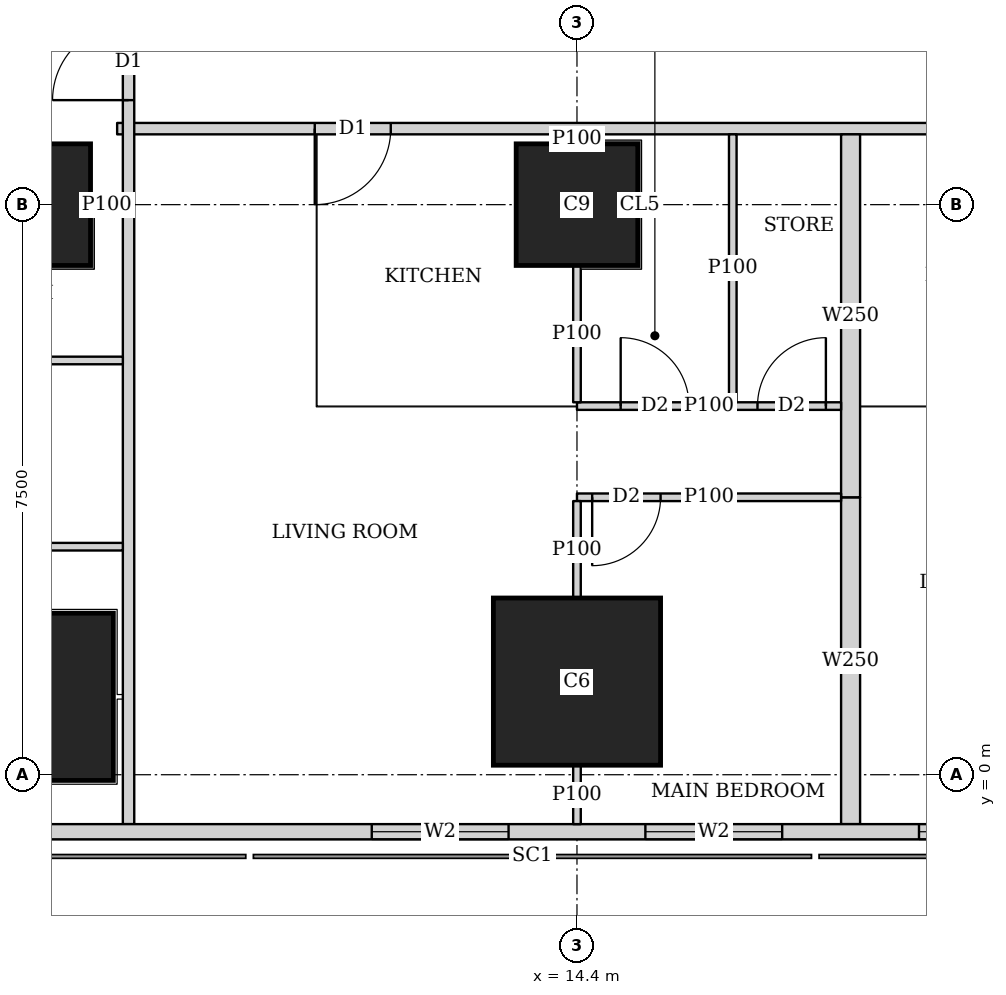
"""IFC4 building model, lengths in metres.
Left out: names, types, materials, properties, quantities, classifications, styles, units other than length and angle.
Written with IfcOpenShell. Run it as: python <this file> out.ifc"""

import sys

from ifc_helpers import new_model, si_unit, direction, frame, frame_2d, origin, origin_2d, place, context, subcontext, project, spatial, rectangle, extrude, element, fill, save


model = new_model("IFC4")
c1 = context("Model", 3, precision=1e-05, world=origin(), true_north=direction((0.0, 1.0)))
c2 = subcontext(c1, "Body", "Model", "MODEL_VIEW")
j1 = project(units=[si_unit("LENGTHUNIT", "METRE"), si_unit("PLANEANGLEUNIT", "RADIAN")], contexts=[c1])
p1 = place(None, origin())
s1 = spatial("IfcSite", under=j1, at=p1, CompositionType="ELEMENT")
p2 = place(p1, origin())
s2 = spatial("IfcBuilding", under=s1, at=p2, CompositionType="ELEMENT")
p3 = place(p2, frame((0.0, 0.0, 89.15)))
s3 = spatial("IfcBuildingStorey", under=s2, at=p3, CompositionType="ELEMENT", Elevation=89.15)
for number, where, z_axis, x_axis in (
    (1, (7.2, 1.025, 0.0), (0.0, 0.0, 1.0), (1.0, 0.0, 0.0)),
    (2, (14.4, 1.225, 0.0), (0.0, 0.0, 1.0), (1.0, 0.0, 0.0)),
):
    element("IfcColumn", number, at=place(p3, frame(where, z_axis=z_axis, x_axis=x_axis)), inside=s3, PredefinedType="COLUMN", context=c2, shape_type="SweptSolid", body=[
        extrude(rectangle(XDim=2.2, YDim=2.2, at=origin_2d()), origin(), (0.0, 0.0, 1.0), 3.75),
    ])
for number, where, z_axis, x_axis in (
    (3, (7.2, 7.5, 0.0), (0.0, 0.0, 1.0), (1.0, 0.0, 0.0)),
    (4, (14.4, 7.5, 0.0), (0.0, 0.0, 1.0), (1.0, 0.0, 0.0)),
):
    element("IfcColumn", number, at=place(p3, frame(where, z_axis=z_axis, x_axis=x_axis)), inside=s3, PredefinedType="COLUMN", context=c2, shape_type="SweptSolid", body=[
        extrude(rectangle(XDim=1.6, YDim=1.6, at=origin_2d()), origin(), (0.0, 0.0, 1.0), 3.75),
    ])
p4 = place(p3, frame((2.163, -0.75, 0.0), z_axis=(0.0, 0.0, 1.0), x_axis=(1.0, 0.0, 0.0)))
e5 = element("IfcWall", 5, at=p4, inside=s3, PredefinedType="SOLIDWALL", context=c2, shape_type="SweptSolid", body=[
    extrude(rectangle(XDim=45.628, YDim=0.2, at=frame_2d((22.814, 0.0))), origin(), (0.0, 0.0, 1.0), 3.5),
])
p5 = place(p4, frame((9.537, 0.0, 0.9)))
e6 = element("IfcOpeningElement", 6, at=p5, cuts=e5, PredefinedType="OPENING", context=c2, shape_type="SweptSolid", body=[
    extrude(rectangle(XDim=1.8, YDim=1.5, at=frame_2d((0.9, 0.75))), frame((0.0, 0.11, 0.0), z_axis=(0.0, -1.0, 0.0), x_axis=(1.0, 0.0, 0.0)), (0.0, 0.0, 1.0), 0.22),
])
p6 = place(p4, frame((13.137, 0.0, 0.9)))
e7 = element("IfcOpeningElement", 7, at=p6, cuts=e5, PredefinedType="OPENING", context=c2, shape_type="SweptSolid", body=[
    extrude(rectangle(XDim=1.8, YDim=1.5, at=frame_2d((0.9, 0.75))), frame((0.0, 0.11, 0.0), z_axis=(0.0, -1.0, 0.0), x_axis=(1.0, 0.0, 0.0)), (0.0, 0.0, 1.0), 0.22),
])
p7 = place(p4, frame((16.737, 0.0, 0.9)))
e8 = element("IfcOpeningElement", 8, at=p7, cuts=e5, PredefinedType="OPENING", context=c2, shape_type="SweptSolid", body=[
    extrude(rectangle(XDim=1.8, YDim=1.5, at=frame_2d((0.9, 0.75))), frame((0.0, 0.11, 0.0), z_axis=(0.0, -1.0, 0.0), x_axis=(1.0, 0.0, 0.0)), (0.0, 0.0, 1.0), 0.22),
])
p8 = place(p4, frame((20.337, 0.0, 0.9)))
e9 = element("IfcOpeningElement", 9, at=p8, cuts=e5, PredefinedType="OPENING", context=c2, shape_type="SweptSolid", body=[
    extrude(rectangle(XDim=1.8, YDim=1.5, at=frame_2d((0.9, 0.75))), frame((0.0, 0.11, 0.0), z_axis=(0.0, -1.0, 0.0), x_axis=(1.0, 0.0, 0.0)), (0.0, 0.0, 1.0), 0.22),
])
p9 = place(p4, frame((23.937, 0.0, 0.9)))
e10 = element("IfcOpeningElement", 10, at=p9, cuts=e5, PredefinedType="OPENING", context=c2, shape_type="SweptSolid", body=[
    extrude(rectangle(XDim=1.8, YDim=1.5, at=frame_2d((0.9, 0.75))), frame((0.0, 0.11, 0.0), z_axis=(0.0, -1.0, 0.0), x_axis=(1.0, 0.0, 0.0)), (0.0, 0.0, 1.0), 0.22),
])
p10 = place(p4, frame((27.537, 0.0, 0.9)))
e11 = element("IfcOpeningElement", 11, at=p10, cuts=e5, PredefinedType="OPENING", context=c2, shape_type="SweptSolid", body=[
    extrude(rectangle(XDim=1.8, YDim=1.5, at=frame_2d((0.9, 0.75))), frame((0.0, 0.11, 0.0), z_axis=(0.0, -1.0, 0.0), x_axis=(1.0, 0.0, 0.0)), (0.0, 0.0, 1.0), 0.22),
])
p11 = place(p4, frame((31.137, 0.0, 0.9)))
e12 = element("IfcOpeningElement", 12, at=p11, cuts=e5, PredefinedType="OPENING", context=c2, shape_type="SweptSolid", body=[
    extrude(rectangle(XDim=1.8, YDim=1.5, at=frame_2d((0.9, 0.75))), frame((0.0, 0.11, 0.0), z_axis=(0.0, -1.0, 0.0), x_axis=(1.0, 0.0, 0.0)), (0.0, 0.0, 1.0), 0.22),
])
p12 = place(p4, frame((34.737, 0.0, 0.9)))
e13 = element("IfcOpeningElement", 13, at=p12, cuts=e5, PredefinedType="OPENING", context=c2, shape_type="SweptSolid", body=[
    extrude(rectangle(XDim=1.8, YDim=1.5, at=frame_2d((0.9, 0.75))), frame((0.0, 0.11, 0.0), z_axis=(0.0, -1.0, 0.0), x_axis=(1.0, 0.0, 0.0)), (0.0, 0.0, 1.0), 0.22),
])
p13 = place(p3, frame((8.5, -0.65, 0.0), z_axis=(0.0, 0.0, 1.0), x_axis=(0.0, 1.0, 0.0)))
e14 = element("IfcWall", 14, at=p13, inside=s3, PredefinedType="SOLIDWALL", context=c2, shape_type="SweptSolid", body=[
    extrude(rectangle(XDim=46.3, YDim=0.15, at=frame_2d((23.15, 0.0))), origin(), (0.0, 0.0, 1.0), 2.2),
])
p14 = place(p13, frame((9.525, 0.0, 0.0)))
e15 = element("IfcOpeningElement", 15, at=p14, cuts=e14, PredefinedType="OPENING", context=c2, shape_type="SweptSolid", body=[
    extrude(rectangle(XDim=1.0, YDim=2.1, at=frame_2d((0.5, 1.05))), frame((0.0, 0.085, 0.0), z_axis=(0.0, -1.0, 0.0), x_axis=(1.0, 0.0, 0.0)), (0.0, 0.0, 1.0), 0.17),
])
p15 = place(p13, frame((13.275, 0.0, 0.0)))
e16 = element("IfcOpeningElement", 16, at=p15, cuts=e14, PredefinedType="OPENING", context=c2, shape_type="SweptSolid", body=[
    extrude(rectangle(XDim=1.0, YDim=2.1, at=frame_2d((0.5, 1.05))), frame((0.0, 0.085, 0.0), z_axis=(0.0, -1.0, 0.0), x_axis=(1.0, 0.0, 0.0)), (0.0, 0.0, 1.0), 0.17),
])
p16 = place(p13, frame((20.775, 0.0, 0.0)))
e17 = element("IfcOpeningElement", 17, at=p16, cuts=e14, PredefinedType="OPENING", context=c2, shape_type="SweptSolid", body=[
    extrude(rectangle(XDim=1.0, YDim=2.1, at=frame_2d((0.5, 1.05))), frame((0.0, 0.085, 0.0), z_axis=(0.0, -1.0, 0.0), x_axis=(1.0, 0.0, 0.0)), (0.0, 0.0, 1.0), 0.17),
])
p17 = place(p13, frame((32.025, 0.0, 0.0)))
e18 = element("IfcOpeningElement", 18, at=p17, cuts=e14, PredefinedType="OPENING", context=c2, shape_type="SweptSolid", body=[
    extrude(rectangle(XDim=1.0, YDim=2.1, at=frame_2d((0.5, 1.05))), frame((0.0, 0.085, 0.0), z_axis=(0.0, -1.0, 0.0), x_axis=(1.0, 0.0, 0.0)), (0.0, 0.0, 1.0), 0.17),
])
p18 = place(p3, frame((40.053, 8.5, 0.0), z_axis=(0.0, 0.0, 1.0), x_axis=(-1.0, 0.0, 0.0)))
e19 = element("IfcWall", 19, at=p18, inside=s3, PredefinedType="SOLIDWALL", context=c2, shape_type="SweptSolid", body=[
    extrude(rectangle(XDim=31.703, YDim=0.15, at=frame_2d((15.852, 0.0))), origin(), (0.0, 0.0, 1.0), 3.5),
])
p19 = place(p18, frame((28.103, 0.0, 0.0)))
e20 = element("IfcOpeningElement", 20, at=p19, cuts=e19, PredefinedType="OPENING", context=c2, shape_type="SweptSolid", body=[
    extrude(rectangle(XDim=1.0, YDim=2.1, at=frame_2d((0.5, 1.05))), frame((0.0, 0.085, 0.0), z_axis=(0.0, -1.0, 0.0), x_axis=(1.0, 0.0, 0.0)), (0.0, 0.0, 1.0), 0.17),
])
p20 = place(p18, frame((19.953, 0.0, 0.0)))
e21 = element("IfcOpeningElement", 21, at=p20, cuts=e19, PredefinedType="OPENING", context=c2, shape_type="SweptSolid", body=[
    extrude(rectangle(XDim=1.0, YDim=2.1, at=frame_2d((0.5, 1.05))), frame((0.0, 0.085, 0.0), z_axis=(0.0, -1.0, 0.0), x_axis=(1.0, 0.0, 0.0)), (0.0, 0.0, 1.0), 0.17),
])
p21 = place(p18, frame((12.753, 0.0, 0.0)))
e22 = element("IfcOpeningElement", 22, at=p21, cuts=e19, PredefinedType="OPENING", context=c2, shape_type="SweptSolid", body=[
    extrude(rectangle(XDim=1.0, YDim=2.1, at=frame_2d((0.5, 1.05))), frame((0.0, 0.085, 0.0), z_axis=(0.0, -1.0, 0.0), x_axis=(1.0, 0.0, 0.0)), (0.0, 0.0, 1.0), 0.17),
])
p22 = place(p18, frame((0.15, 0.0, 0.0)))
e23 = element("IfcOpeningElement", 23, at=p22, cuts=e19, PredefinedType="OPENING", context=c2, shape_type="SweptSolid", body=[
    extrude(rectangle(XDim=1.0, YDim=2.1, at=frame_2d((0.5, 1.05))), frame((0.0, 0.085, 0.0), z_axis=(0.0, -1.0, 0.0), x_axis=(1.0, 0.0, 0.0)), (0.0, 0.0, 1.0), 0.17),
])
p23 = place(p3, frame((8.001, 7.5, 0.0), z_axis=(0.0, 0.0, 1.0), x_axis=(1.0, 0.0, 0.0)))
e24 = element("IfcWall", 24, at=p23, inside=s3, PredefinedType="PARTITIONING", context=c2, shape_type="SweptSolid", body=[
    extrude(rectangle(XDim=0.424, YDim=0.1, at=frame_2d((0.212, 0.0))), origin(), (0.0, 0.0, 1.0), 3.5),
])
p24 = place(p3, frame((4.9, 5.45, 0.0), z_axis=(0.0, 0.0, 1.0), x_axis=(1.0, 0.0, 0.0)))
e25 = element("IfcWall", 25, at=p24, inside=s3, PredefinedType="PARTITIONING", context=c2, shape_type="SweptSolid", body=[
    extrude(rectangle(XDim=3.525, YDim=0.1, at=frame_2d((1.763, 0.0))), origin(), (0.0, 0.0, 1.0), 3.5),
])
p25 = place(p3, frame((17.875, 3.65, 0.0), z_axis=(0.0, 0.0, 1.0), x_axis=(-1.0, 0.0, 0.0)))
e26 = element("IfcWall", 26, at=p25, inside=s3, PredefinedType="PARTITIONING", context=c2, shape_type="SweptSolid", body=[
    extrude(rectangle(XDim=3.475, YDim=0.1, at=frame_2d((1.738, 0.0))), origin(), (0.0, 0.0, 1.0), 3.5),
])
p26 = place(p25, frame((2.375, 0.0, 0.0)))
e27 = element("IfcOpeningElement", 27, at=p26, cuts=e26, PredefinedType="OPENING", context=c2, shape_type="SweptSolid", body=[
    extrude(rectangle(XDim=0.9, YDim=2.1, at=frame_2d((0.45, 1.05))), frame((0.0, 0.06, 0.0), z_axis=(0.0, -1.0, 0.0), x_axis=(1.0, 0.0, 0.0)), (0.0, 0.0, 1.0), 0.12),
])
p27 = place(p3, frame((17.875, 4.85, 0.0), z_axis=(0.0, 0.0, 1.0), x_axis=(-1.0, 0.0, 0.0)))
e28 = element("IfcWall", 28, at=p27, inside=s3, PredefinedType="PARTITIONING", context=c2, shape_type="SweptSolid", body=[
    extrude(rectangle(XDim=3.475, YDim=0.1, at=frame_2d((1.738, 0.0))), origin(), (0.0, 0.0, 1.0), 3.5),
])
p28 = place(p27, frame((2.0, 0.0, 0.0)))
e29 = element("IfcOpeningElement", 29, at=p28, cuts=e28, PredefinedType="OPENING", context=c2, shape_type="SweptSolid", body=[
    extrude(rectangle(XDim=0.9, YDim=2.1, at=frame_2d((0.45, 1.05))), frame((0.0, 0.06, 0.0), z_axis=(0.0, -1.0, 0.0), x_axis=(1.0, 0.0, 0.0)), (0.0, 0.0, 1.0), 0.12),
])
p29 = place(p27, frame((0.2, 0.0, 0.0)))
e30 = element("IfcOpeningElement", 30, at=p29, cuts=e28, PredefinedType="OPENING", context=c2, shape_type="SweptSolid", body=[
    extrude(rectangle(XDim=0.9, YDim=2.1, at=frame_2d((0.45, 1.05))), frame((0.0, 0.06, 0.0), z_axis=(0.0, -1.0, 0.0), x_axis=(1.0, 0.0, 0.0)), (0.0, 0.0, 1.0), 0.12),
])
p30 = place(p3, frame((14.4, -0.65, 0.0), z_axis=(0.0, 0.0, 1.0), x_axis=(0.0, 1.0, 0.0)))
e31 = element("IfcWall", 31, at=p30, inside=s3, PredefinedType="PARTITIONING", context=c2, shape_type="SweptSolid", body=[
    extrude(rectangle(XDim=0.774, YDim=0.1, at=frame_2d((0.387, 0.0))), origin(), (0.0, 0.0, 1.0), 3.5),
])
p31 = place(p3, frame((14.4, 2.326, 0.0), z_axis=(0.0, 0.0, 1.0), x_axis=(0.0, 1.0, 0.0)))
e32 = element("IfcWall", 32, at=p31, inside=s3, PredefinedType="PARTITIONING", context=c2, shape_type="SweptSolid", body=[
    extrude(rectangle(XDim=1.274, YDim=0.1, at=frame_2d((0.637, 0.0))), origin(), (0.0, 0.0, 1.0), 3.5),
])
p32 = place(p3, frame((14.4, 4.9, 0.0), z_axis=(0.0, 0.0, 1.0), x_axis=(0.0, 1.0, 0.0)))
e33 = element("IfcWall", 33, at=p32, inside=s3, PredefinedType="PARTITIONING", context=c2, shape_type="SweptSolid", body=[
    extrude(rectangle(XDim=1.799, YDim=0.1, at=frame_2d((0.899, 0.0))), origin(), (0.0, 0.0, 1.0), 3.5),
])
p33 = place(p3, frame((14.4, 8.301, 0.0), z_axis=(0.0, 0.0, 1.0), x_axis=(0.0, 1.0, 0.0)))
e34 = element("IfcWall", 34, at=p33, inside=s3, PredefinedType="PARTITIONING", context=c2, shape_type="SweptSolid", body=[
    extrude(rectangle(XDim=0.124, YDim=0.1, at=frame_2d((0.062, 0.0))), origin(), (0.0, 0.0, 1.0), 3.5),
])
p34 = place(p3, frame((16.45, 4.9, 0.0), z_axis=(0.0, 0.0, 1.0), x_axis=(0.0, 1.0, 0.0)))
e35 = element("IfcWall", 35, at=p34, inside=s3, PredefinedType="PARTITIONING", context=c2, shape_type="SweptSolid", body=[
    extrude(rectangle(XDim=3.525, YDim=0.1, at=frame_2d((1.763, 0.0))), origin(), (0.0, 0.0, 1.0), 3.5),
])
p35 = place(p3, frame((18.0, -0.65, 0.0), z_axis=(0.0, 0.0, 1.0), x_axis=(0.0, 1.0, 0.0)))
e36 = element("IfcWall", 36, at=p35, inside=s3, PredefinedType="SOLIDWALL", context=c2, shape_type="SweptSolid", body=[
    extrude(rectangle(XDim=4.3, YDim=0.25, at=frame_2d((2.15, 0.0))), origin(), (0.0, 0.0, 1.0), 2.2),
])
p36 = place(p3, frame((18.0, 3.65, 0.0), z_axis=(0.0, 0.0, 1.0), x_axis=(0.0, 1.0, 0.0)))
e37 = element("IfcWall", 37, at=p36, inside=s3, PredefinedType="SOLIDWALL", context=c2, shape_type="SweptSolid", body=[
    extrude(rectangle(XDim=4.775, YDim=0.25, at=frame_2d((2.388, 0.0))), origin(), (0.0, 0.0, 1.0), 3.5),
])
p37 = place(p3, frame((8.425, 3.0, 0.0), z_axis=(0.0, 0.0, 1.0), x_axis=(-1.0, 0.0, 0.0)))
e38 = element("IfcWall", 38, at=p37, inside=s3, PredefinedType="PARTITIONING", context=c2, shape_type="SweptSolid", body=[
    extrude(rectangle(XDim=3.525, YDim=0.1, at=frame_2d((1.763, 0.0))), origin(), (0.0, 0.0, 1.0), 3.5),
])
p38 = place(p37, frame((2.35, 0.0, 0.0)))
e39 = element("IfcOpeningElement", 39, at=p38, cuts=e38, PredefinedType="OPENING", context=c2, shape_type="SweptSolid", body=[
    extrude(rectangle(XDim=0.9, YDim=2.1, at=frame_2d((0.45, 1.05))), frame((0.0, 0.06, 0.0), z_axis=(0.0, -1.0, 0.0), x_axis=(1.0, 0.0, 0.0)), (0.0, 0.0, 1.0), 0.12),
])
p39 = place(p5, origin())
e40 = element("IfcWindow", 40, at=p39, inside=s3, PartitioningType="SINGLE_PANEL", PredefinedType="WINDOW", context=c2, shape_type="SweptSolid", body=[
    extrude(rectangle(XDim=1.8, YDim=1.5, at=frame_2d((0.9, 0.75))), frame((0.0, 0.03, 0.0), z_axis=(0.0, -1.0, 0.0), x_axis=(1.0, 0.0, 0.0)), (0.0, 0.0, 1.0), 0.06),
])
fill(e6, e40)
p40 = place(p6, origin())
e41 = element("IfcWindow", 41, at=p40, inside=s3, PartitioningType="SINGLE_PANEL", PredefinedType="WINDOW", context=c2, shape_type="SweptSolid", body=[
    extrude(rectangle(XDim=1.8, YDim=1.5, at=frame_2d((0.9, 0.75))), frame((0.0, 0.03, 0.0), z_axis=(0.0, -1.0, 0.0), x_axis=(1.0, 0.0, 0.0)), (0.0, 0.0, 1.0), 0.06),
])
fill(e7, e41)
p41 = place(p7, origin())
e42 = element("IfcWindow", 42, at=p41, inside=s3, PartitioningType="SINGLE_PANEL", PredefinedType="WINDOW", context=c2, shape_type="SweptSolid", body=[
    extrude(rectangle(XDim=1.8, YDim=1.5, at=frame_2d((0.9, 0.75))), frame((0.0, 0.03, 0.0), z_axis=(0.0, -1.0, 0.0), x_axis=(1.0, 0.0, 0.0)), (0.0, 0.0, 1.0), 0.06),
])
fill(e8, e42)
p42 = place(p14, origin())
e43 = element("IfcDoor", 43, at=p42, inside=s3, OperationType="SINGLE_SWING_LEFT", PredefinedType="DOOR", context=c2, shape_type="SweptSolid", body=[
    extrude(rectangle(XDim=1.0, YDim=2.1, at=frame_2d((0.5, 1.05))), frame((0.0, 0.025, 0.0), z_axis=(0.0, -1.0, 0.0), x_axis=(1.0, 0.0, 0.0)), (0.0, 0.0, 1.0), 0.05),
])
fill(e15, e43)
p43 = place(p26, origin())
e44 = element("IfcDoor", 44, at=p43, inside=s3, OperationType="SINGLE_SWING_RIGHT", PredefinedType="DOOR", context=c2, shape_type="SweptSolid", body=[
    extrude(rectangle(XDim=0.9, YDim=2.1, at=frame_2d((0.45, 1.05))), frame((0.0, 0.025, 0.0), z_axis=(0.0, -1.0, 0.0), x_axis=(1.0, 0.0, 0.0)), (0.0, 0.0, 1.0), 0.05),
])
fill(e27, e44)
p44 = place(p28, origin())
e45 = element("IfcDoor", 45, at=p44, inside=s3, OperationType="SINGLE_SWING_LEFT", PredefinedType="DOOR", context=c2, shape_type="SweptSolid", body=[
    extrude(rectangle(XDim=0.9, YDim=2.1, at=frame_2d((0.45, 1.05))), frame((0.0, 0.025, 0.0), z_axis=(0.0, -1.0, 0.0), x_axis=(1.0, 0.0, 0.0)), (0.0, 0.0, 1.0), 0.05),
])
fill(e29, e45)
p45 = place(p29, origin())
e46 = element("IfcDoor", 46, at=p45, inside=s3, OperationType="SINGLE_SWING_RIGHT", PredefinedType="DOOR", context=c2, shape_type="SweptSolid", body=[
    extrude(rectangle(XDim=0.9, YDim=2.1, at=frame_2d((0.45, 1.05))), frame((0.0, 0.025, 0.0), z_axis=(0.0, -1.0, 0.0), x_axis=(1.0, 0.0, 0.0)), (0.0, 0.0, 1.0), 0.05),
])
fill(e30, e46)
p46 = place(p19, origin())
e47 = element("IfcDoor", 47, at=p46, inside=s3, OperationType="SINGLE_SWING_RIGHT", PredefinedType="DOOR", context=c2, shape_type="SweptSolid", body=[
    extrude(rectangle(XDim=1.0, YDim=2.1, at=frame_2d((0.5, 1.05))), frame((0.0, 0.025, 0.0), z_axis=(0.0, -1.0, 0.0), x_axis=(1.0, 0.0, 0.0)), (0.0, 0.0, 1.0), 0.05),
])
fill(e20, e47)
save(model, sys.argv[1])
